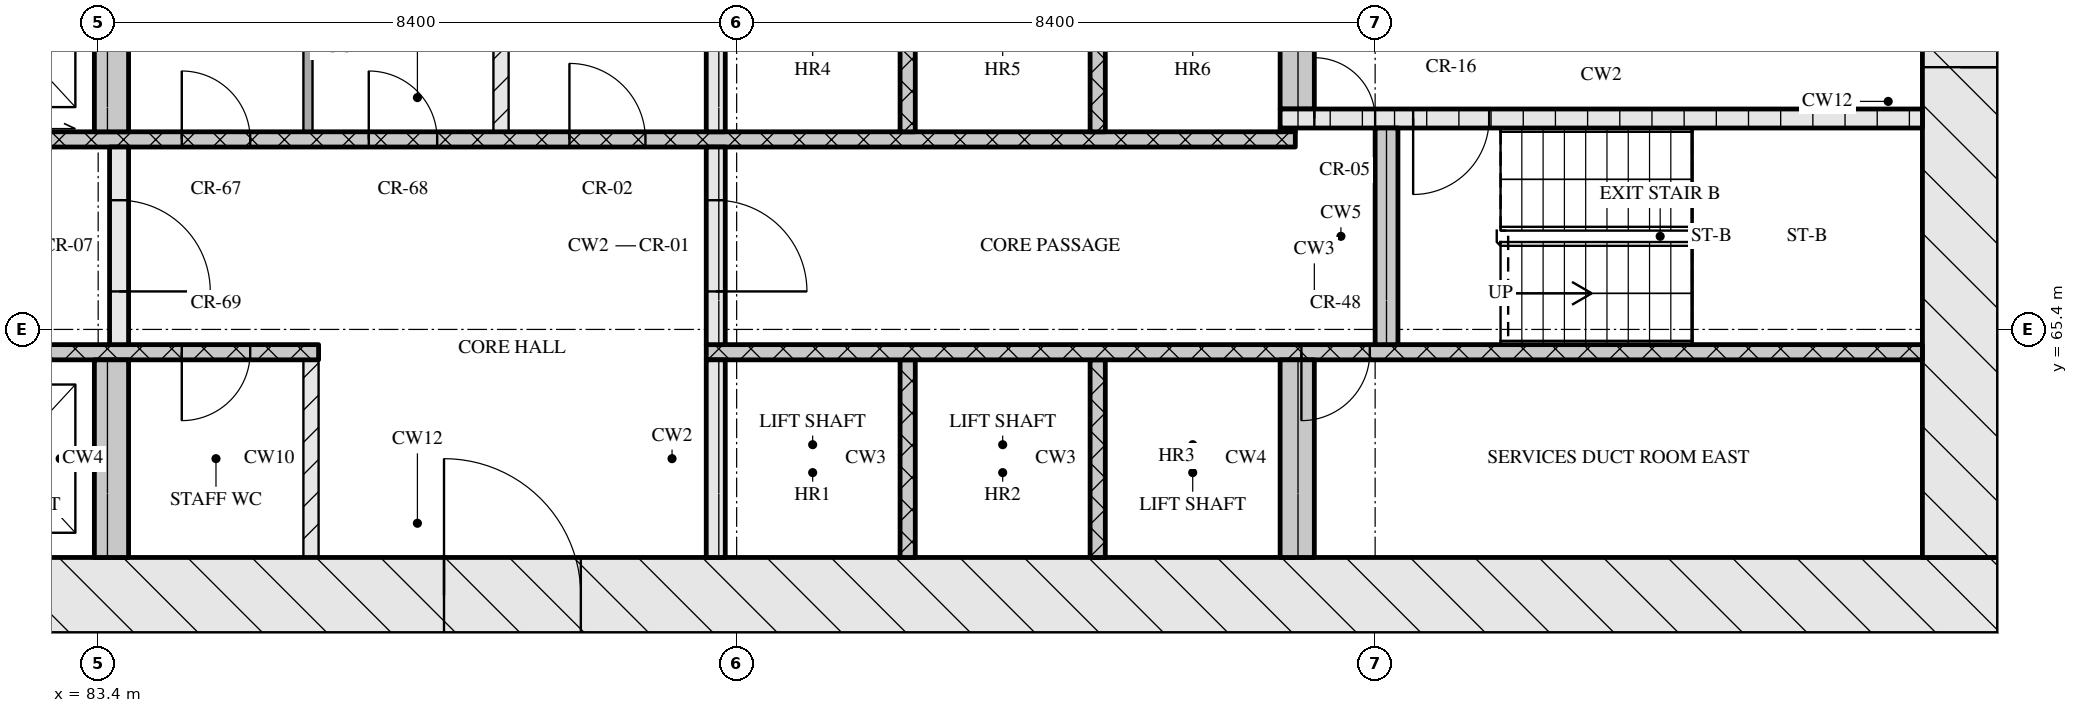
"""IFC4 building model, lengths in metres.
Left out: names, types, materials, properties, quantities, classifications, styles, units other than length and angle.
Written with IfcOpenShell. Run it as: python <this file> out.ifc"""

import sys

from ifc_helpers import new_model, si_unit, direction, frame, frame_2d, origin, place, context, subcontext, project, spatial, rectangle, extrude, element, fill, save


model = new_model("IFC4")
c1 = context("Model", 3, precision=1e-05, world=origin(), true_north=direction((0.0, 1.0)))
c2 = subcontext(c1, "Body", "Model", "MODEL_VIEW")
j1 = project(units=[si_unit("LENGTHUNIT", "METRE"), si_unit("PLANEANGLEUNIT", "RADIAN")], contexts=[c1])
p1 = place(None, origin())
s1 = spatial("IfcSite", under=j1, at=p1, CompositionType="ELEMENT")
p2 = place(p1, origin())
s2 = spatial("IfcBuilding", under=s1, at=p2, CompositionType="ELEMENT")
p3 = place(p2, frame((0.0, 0.0, 116.85)))
s3 = spatial("IfcBuildingStorey", under=s2, at=p3, CompositionType="ELEMENT", Elevation=116.85)
p4 = place(p3, frame((66.8, 61.9, 0.0), z_axis=(0.0, 0.0, 1.0), x_axis=(1.0, 0.0, 0.0)))
e1 = element("IfcWall", 1, at=p4, inside=s3, PredefinedType="SOLIDWALL", context=c2, shape_type="SweptSolid", body=[
    extrude(rectangle(XDim=41.6, YDim=1.0, at=frame_2d((20.8, 0.0))), origin(), (0.0, 0.0, 1.0), 3.32),
])
p5 = place(p4, frame((21.15, 0.0, 0.0)))
e2 = element("IfcOpeningElement", 2, at=p5, cuts=e1, PredefinedType="OPENING", context=c2, shape_type="SweptSolid", body=[
    extrude(rectangle(XDim=1.8, YDim=2.1, at=frame_2d((0.9, 1.05))), frame((0.0, 0.51, 0.0), z_axis=(0.0, -1.0, 0.0), x_axis=(1.0, 0.0, 0.0)), (0.0, 0.0, 1.0), 1.02),
])
p6 = place(p3, frame((107.9, 62.4, 0.0), z_axis=(0.0, 0.0, 1.0), x_axis=(0.0, 1.0, 0.0)))
e3 = element("IfcWall", 3, at=p6, inside=s3, PredefinedType="SOLIDWALL", context=c2, shape_type="SweptSolid", body=[
    extrude(rectangle(XDim=12.0, YDim=1.0, at=frame_2d((6.0, 0.0))), origin(), (0.0, 0.0, 1.0), 3.32),
])
p7 = place(p6, frame((6.45, 0.0, 0.0)))
e4 = element("IfcOpeningElement", 4, at=p7, cuts=e3, PredefinedType="OPENING", context=c2, shape_type="SweptSolid", body=[
    extrude(rectangle(XDim=1.2, YDim=2.1, at=frame_2d((0.6, 1.05))), frame((0.0, 0.51, 0.0), z_axis=(0.0, -1.0, 0.0), x_axis=(1.0, 0.0, 0.0)), (0.0, 0.0, 1.0), 1.02),
])
p8 = place(p3, frame((83.575, 62.4, 0.0), z_axis=(0.0, 0.0, 1.0), x_axis=(0.0, 1.0, 0.0)))
e5 = element("IfcWall", 5, at=p8, inside=s3, PredefinedType="SOLIDWALL", context=c2, shape_type="SweptSolid", body=[
    extrude(rectangle(XDim=2.6, YDim=0.45, at=frame_2d((1.3, 0.0))), origin(), (0.0, 0.0, 1.0), 3.32),
])
p9 = place(p3, frame((86.2, 62.4, 0.0), z_axis=(0.0, 0.0, 1.0), x_axis=(0.0, 1.0, 0.0)))
e6 = element("IfcWall", 6, at=p9, inside=s3, PredefinedType="PARTITIONING", context=c2, shape_type="SweptSolid", body=[
    extrude(rectangle(XDim=2.6, YDim=0.2, at=frame_2d((1.3, 0.0))), origin(), (0.0, 0.0, 1.0), 3.32),
])
p10 = place(p3, frame((91.525, 62.4, 0.0), z_axis=(0.0, 0.0, 1.0), x_axis=(0.0, 1.0, 0.0)))
e7 = element("IfcWall", 7, at=p10, inside=s3, PredefinedType="SOLIDWALL", context=c2, shape_type="SweptSolid", body=[
    extrude(rectangle(XDim=2.6, YDim=0.25, at=frame_2d((1.3, 0.0))), origin(), (0.0, 0.0, 1.0), 3.32),
])
for number, where, z_axis, x_axis in (
    (8, (94.05, 62.4, 0.0), (0.0, 0.0, 1.0), (0.0, 1.0, 0.0)),
    (9, (96.55, 62.4, 0.0), (0.0, 0.0, 1.0), (0.0, 1.0, 0.0)),
):
    element("IfcWall", number, at=place(p3, frame(where, z_axis=z_axis, x_axis=x_axis)), inside=s3, PredefinedType="SOLIDWALL", context=c2, shape_type="SweptSolid", body=[
        extrude(rectangle(XDim=2.6, YDim=0.2, at=frame_2d((1.3, 0.0))), origin(), (0.0, 0.0, 1.0), 3.32),
    ])
p11 = place(p3, frame((99.175, 62.4, 0.0), z_axis=(0.0, 0.0, 1.0), x_axis=(0.0, 1.0, 0.0)))
e10 = element("IfcWall", 10, at=p11, inside=s3, PredefinedType="SOLIDWALL", context=c2, shape_type="SweptSolid", body=[
    extrude(rectangle(XDim=2.6, YDim=0.45, at=frame_2d((1.3, 0.0))), origin(), (0.0, 0.0, 1.0), 3.32),
])
p12 = place(p3, frame((67.8, 65.1, 0.0), z_axis=(0.0, 0.0, 1.0), x_axis=(1.0, 0.0, 0.0)))
e11 = element("IfcWall", 11, at=p12, inside=s3, PredefinedType="SOLIDWALL", context=c2, shape_type="SweptSolid", body=[
    extrude(rectangle(XDim=18.5, YDim=0.2, at=frame_2d((9.25, 0.0))), origin(), (0.0, 0.0, 1.0), 3.32),
])
p13 = place(p12, frame((7.27, 0.0, 0.0)))
e12 = element("IfcOpeningElement", 12, at=p13, cuts=e11, PredefinedType="OPENING", context=c2, shape_type="SweptSolid", body=[
    extrude(rectangle(XDim=0.9, YDim=2.1, at=frame_2d((0.45, 1.05))), frame((0.0, 0.11, 0.0), z_axis=(0.0, -1.0, 0.0), x_axis=(1.0, 0.0, 0.0)), (0.0, 0.0, 1.0), 0.22),
])
p14 = place(p12, frame((8.85, 0.0, 0.0)))
e13 = element("IfcOpeningElement", 13, at=p14, cuts=e11, PredefinedType="OPENING", context=c2, shape_type="SweptSolid", body=[
    extrude(rectangle(XDim=1.1, YDim=2.1, at=frame_2d((0.55, 1.05))), frame((0.0, 0.11, 0.0), z_axis=(0.0, -1.0, 0.0), x_axis=(1.0, 0.0, 0.0)), (0.0, 0.0, 1.0), 0.22),
])
p15 = place(p12, frame((11.35, 0.0, 0.0)))
e14 = element("IfcOpeningElement", 14, at=p15, cuts=e11, PredefinedType="OPENING", context=c2, shape_type="SweptSolid", body=[
    extrude(rectangle(XDim=1.1, YDim=2.1, at=frame_2d((0.55, 1.05))), frame((0.0, 0.11, 0.0), z_axis=(0.0, -1.0, 0.0), x_axis=(1.0, 0.0, 0.0)), (0.0, 0.0, 1.0), 0.22),
])
p16 = place(p12, frame((13.85, 0.0, 0.0)))
e15 = element("IfcOpeningElement", 15, at=p16, cuts=e11, PredefinedType="OPENING", context=c2, shape_type="SweptSolid", body=[
    extrude(rectangle(XDim=1.1, YDim=2.1, at=frame_2d((0.55, 1.05))), frame((0.0, 0.11, 0.0), z_axis=(0.0, -1.0, 0.0), x_axis=(1.0, 0.0, 0.0)), (0.0, 0.0, 1.0), 0.22),
])
p17 = place(p12, frame((16.7, 0.0, 0.0)))
e16 = element("IfcOpeningElement", 16, at=p17, cuts=e11, PredefinedType="OPENING", context=c2, shape_type="SweptSolid", body=[
    extrude(rectangle(XDim=0.9, YDim=2.1, at=frame_2d((0.45, 1.05))), frame((0.0, 0.11, 0.0), z_axis=(0.0, -1.0, 0.0), x_axis=(1.0, 0.0, 0.0)), (0.0, 0.0, 1.0), 0.22),
])
p18 = place(p3, frame((91.4, 65.1, 0.0), z_axis=(0.0, 0.0, 1.0), x_axis=(1.0, 0.0, 0.0)))
e17 = element("IfcWall", 17, at=p18, inside=s3, PredefinedType="SOLIDWALL", context=c2, shape_type="SweptSolid", body=[
    extrude(rectangle(XDim=16.0, YDim=0.2, at=frame_2d((8.0, 0.0))), origin(), (0.0, 0.0, 1.0), 3.32),
])
p19 = place(p18, frame((7.83, 0.0, 0.0)))
e18 = element("IfcOpeningElement", 18, at=p19, cuts=e17, PredefinedType="OPENING", context=c2, shape_type="SweptSolid", body=[
    extrude(rectangle(XDim=0.9, YDim=2.1, at=frame_2d((0.45, 1.05))), frame((0.0, 0.11, 0.0), z_axis=(0.0, -1.0, 0.0), x_axis=(1.0, 0.0, 0.0)), (0.0, 0.0, 1.0), 0.22),
])
p20 = place(p3, frame((83.675, 65.2, 0.0), z_axis=(0.0, 0.0, 1.0), x_axis=(0.0, 1.0, 0.0)))
e19 = element("IfcWall", 19, at=p20, inside=s3, PredefinedType="SOLIDWALL", context=c2, shape_type="SweptSolid", body=[
    extrude(rectangle(XDim=2.6, YDim=0.25, at=frame_2d((1.3, 0.0))), origin(), (0.0, 0.0, 1.0), 3.32),
])
p21 = place(p20, frame((0.7, 0.0, 0.0)))
e20 = element("IfcOpeningElement", 20, at=p21, cuts=e19, PredefinedType="OPENING", context=c2, shape_type="SweptSolid", body=[
    extrude(rectangle(XDim=1.2, YDim=2.1, at=frame_2d((0.6, 1.05))), frame((0.0, 0.135, 0.0), z_axis=(0.0, -1.0, 0.0), x_axis=(1.0, 0.0, 0.0)), (0.0, 0.0, 1.0), 0.27),
])
p22 = place(p3, frame((91.525, 65.2, 0.0), z_axis=(0.0, 0.0, 1.0), x_axis=(0.0, 1.0, 0.0)))
e21 = element("IfcWall", 21, at=p22, inside=s3, PredefinedType="SOLIDWALL", context=c2, shape_type="SweptSolid", body=[
    extrude(rectangle(XDim=2.6, YDim=0.25, at=frame_2d((1.3, 0.0))), origin(), (0.0, 0.0, 1.0), 3.32),
])
p23 = place(p22, frame((0.7, 0.0, 0.0)))
e22 = element("IfcOpeningElement", 22, at=p23, cuts=e21, PredefinedType="OPENING", context=c2, shape_type="SweptSolid", body=[
    extrude(rectangle(XDim=1.2, YDim=2.1, at=frame_2d((0.6, 1.05))), frame((0.0, 0.135, 0.0), z_axis=(0.0, -1.0, 0.0), x_axis=(1.0, 0.0, 0.0)), (0.0, 0.0, 1.0), 0.27),
])
p24 = place(p3, frame((100.35, 65.2, 0.0), z_axis=(0.0, 0.0, 1.0), x_axis=(0.0, 1.0, 0.0)))
e23 = element("IfcWall", 23, at=p24, inside=s3, PredefinedType="SOLIDWALL", context=c2, shape_type="SweptSolid", body=[
    extrude(rectangle(XDim=2.85, YDim=0.3, at=frame_2d((1.425, 0.0))), origin(), (0.0, 0.0, 1.0), 3.32),
])
p25 = place(p3, frame((76.05, 67.9, 0.0), z_axis=(0.0, 0.0, 1.0), x_axis=(1.0, 0.0, 0.0)))
e24 = element("IfcWall", 24, at=p25, inside=s3, PredefinedType="SOLIDWALL", context=c2, shape_type="SweptSolid", body=[
    extrude(rectangle(XDim=23.1, YDim=0.2, at=frame_2d((11.55, 0.0))), origin(), (0.0, 0.0, 1.0), 3.32),
])
p26 = place(p25, frame((0.6, 0.0, 0.0)))
e25 = element("IfcOpeningElement", 25, at=p26, cuts=e24, PredefinedType="OPENING", context=c2, shape_type="SweptSolid", body=[
    extrude(rectangle(XDim=1.1, YDim=2.1, at=frame_2d((0.55, 1.05))), frame((0.0, 0.11, 0.0), z_axis=(0.0, -1.0, 0.0), x_axis=(1.0, 0.0, 0.0)), (0.0, 0.0, 1.0), 0.22),
])
p27 = place(p25, frame((3.1, 0.0, 0.0)))
e26 = element("IfcOpeningElement", 26, at=p27, cuts=e24, PredefinedType="OPENING", context=c2, shape_type="SweptSolid", body=[
    extrude(rectangle(XDim=1.1, YDim=2.1, at=frame_2d((0.55, 1.05))), frame((0.0, 0.11, 0.0), z_axis=(0.0, -1.0, 0.0), x_axis=(1.0, 0.0, 0.0)), (0.0, 0.0, 1.0), 0.22),
])
p28 = place(p25, frame((5.6, 0.0, 0.0)))
e27 = element("IfcOpeningElement", 27, at=p28, cuts=e24, PredefinedType="OPENING", context=c2, shape_type="SweptSolid", body=[
    extrude(rectangle(XDim=1.1, YDim=2.1, at=frame_2d((0.55, 1.05))), frame((0.0, 0.11, 0.0), z_axis=(0.0, -1.0, 0.0), x_axis=(1.0, 0.0, 0.0)), (0.0, 0.0, 1.0), 0.22),
])
p29 = place(p25, frame((8.45, 0.0, 0.0)))
e28 = element("IfcOpeningElement", 28, at=p29, cuts=e24, PredefinedType="OPENING", context=c2, shape_type="SweptSolid", body=[
    extrude(rectangle(XDim=0.9, YDim=2.1, at=frame_2d((0.45, 1.05))), frame((0.0, 0.11, 0.0), z_axis=(0.0, -1.0, 0.0), x_axis=(1.0, 0.0, 0.0)), (0.0, 0.0, 1.0), 0.22),
])
p30 = place(p25, frame((10.91, 0.0, 0.0)))
e29 = element("IfcOpeningElement", 29, at=p30, cuts=e24, PredefinedType="OPENING", context=c2, shape_type="SweptSolid", body=[
    extrude(rectangle(XDim=0.9, YDim=2.1, at=frame_2d((0.45, 1.05))), frame((0.0, 0.11, 0.0), z_axis=(0.0, -1.0, 0.0), x_axis=(1.0, 0.0, 0.0)), (0.0, 0.0, 1.0), 0.22),
])
p31 = place(p25, frame((13.55, 0.0, 0.0)))
e30 = element("IfcOpeningElement", 30, at=p31, cuts=e24, PredefinedType="OPENING", context=c2, shape_type="SweptSolid", body=[
    extrude(rectangle(XDim=1.0, YDim=2.1, at=frame_2d((0.5, 1.05))), frame((0.0, 0.11, 0.0), z_axis=(0.0, -1.0, 0.0), x_axis=(1.0, 0.0, 0.0)), (0.0, 0.0, 1.0), 0.22),
])
p32 = place(p3, frame((83.575, 68.0, 0.0), z_axis=(0.0, 0.0, 1.0), x_axis=(0.0, 1.0, 0.0)))
e31 = element("IfcWall", 31, at=p32, inside=s3, PredefinedType="SOLIDWALL", context=c2, shape_type="SweptSolid", body=[
    extrude(rectangle(XDim=2.6, YDim=0.45, at=frame_2d((1.3, 0.0))), origin(), (0.0, 0.0, 1.0), 3.32),
])
p33 = place(p3, frame((86.16, 68.0, 0.0), z_axis=(0.0, 0.0, 1.0), x_axis=(0.0, 1.0, 0.0)))
e32 = element("IfcWall", 32, at=p33, inside=s3, PredefinedType="PARTITIONING", context=c2, shape_type="SweptSolid", body=[
    extrude(rectangle(XDim=2.6, YDim=0.12, at=frame_2d((1.3, 0.0))), origin(), (0.0, 0.0, 1.0), 3.32),
])
p34 = place(p3, frame((88.7, 68.0, 0.0), z_axis=(0.0, 0.0, 1.0), x_axis=(0.0, 1.0, 0.0)))
e33 = element("IfcWall", 33, at=p34, inside=s3, PredefinedType="PARTITIONING", context=c2, shape_type="SweptSolid", body=[
    extrude(rectangle(XDim=2.6, YDim=0.2, at=frame_2d((1.3, 0.0))), origin(), (0.0, 0.0, 1.0), 3.32),
])
p35 = place(p3, frame((91.525, 68.0, 0.0), z_axis=(0.0, 0.0, 1.0), x_axis=(0.0, 1.0, 0.0)))
e34 = element("IfcWall", 34, at=p35, inside=s3, PredefinedType="SOLIDWALL", context=c2, shape_type="SweptSolid", body=[
    extrude(rectangle(XDim=2.6, YDim=0.25, at=frame_2d((1.3, 0.0))), origin(), (0.0, 0.0, 1.0), 3.32),
])
for number, where, z_axis, x_axis in (
    (35, (94.05, 68.0, 0.0), (0.0, 0.0, 1.0), (0.0, 1.0, 0.0)),
    (36, (96.55, 68.0, 0.0), (0.0, 0.0, 1.0), (0.0, 1.0, 0.0)),
):
    element("IfcWall", number, at=place(p3, frame(where, z_axis=z_axis, x_axis=x_axis)), inside=s3, PredefinedType="SOLIDWALL", context=c2, shape_type="SweptSolid", body=[
        extrude(rectangle(XDim=2.6, YDim=0.2, at=frame_2d((1.3, 0.0))), origin(), (0.0, 0.0, 1.0), 3.32),
    ])
p36 = place(p3, frame((98.95, 68.025, 0.0), z_axis=(0.0, 0.0, 1.0), x_axis=(1.0, 0.0, 0.0)))
e37 = element("IfcWall", 37, at=p36, inside=s3, PredefinedType="SOLIDWALL", context=c2, shape_type="SweptSolid", body=[
    extrude(rectangle(XDim=0.2, YDim=0.05, at=frame_2d((0.1, 0.0))), origin(), (0.0, 0.0, 1.0), 3.32),
])
p37 = place(p3, frame((98.95, 68.175, 0.0), z_axis=(0.0, 0.0, 1.0), x_axis=(1.0, 0.0, 0.0)))
e38 = element("IfcWall", 38, at=p37, inside=s3, PredefinedType="SOLIDWALL", context=c2, shape_type="SweptSolid", body=[
    extrude(rectangle(XDim=8.45, YDim=0.25, at=frame_2d((4.225, 0.0))), origin(), (0.0, 0.0, 1.0), 3.32),
])
p38 = place(p37, frame((0.45, 0.0, 0.0)))
e39 = element("IfcOpeningElement", 39, at=p38, cuts=e38, PredefinedType="OPENING", context=c2, shape_type="SweptSolid", body=[
    extrude(rectangle(XDim=0.8, YDim=2.1, at=frame_2d((0.4, 1.05))), frame((0.0, 0.135, 0.0), z_axis=(0.0, -1.0, 0.0), x_axis=(1.0, 0.0, 0.0)), (0.0, 0.0, 1.0), 0.27),
])
p39 = place(p37, frame((1.75, 0.0, 0.0)))
e40 = element("IfcOpeningElement", 40, at=p39, cuts=e38, PredefinedType="OPENING", context=c2, shape_type="SweptSolid", body=[
    extrude(rectangle(XDim=1.0, YDim=2.1, at=frame_2d((0.5, 1.05))), frame((0.0, 0.135, 0.0), z_axis=(0.0, -1.0, 0.0), x_axis=(1.0, 0.0, 0.0)), (0.0, 0.0, 1.0), 0.27),
])
p40 = place(p3, frame((99.175, 68.3, 0.0), z_axis=(0.0, 0.0, 1.0), x_axis=(0.0, 1.0, 0.0)))
e41 = element("IfcWall", 41, at=p40, inside=s3, PredefinedType="SOLIDWALL", context=c2, shape_type="SweptSolid", body=[
    extrude(rectangle(XDim=2.3, YDim=0.45, at=frame_2d((1.15, 0.0))), origin(), (0.0, 0.0, 1.0), 3.32),
])
p41 = place(p5, origin())
e42 = element("IfcDoor", 42, at=p41, inside=s3, OperationType="DOUBLE_DOOR_SINGLE_SWING", PredefinedType="DOOR", context=c2, shape_type="SweptSolid", body=[
    extrude(rectangle(XDim=1.8, YDim=2.1, at=frame_2d((0.9, 1.05))), frame((0.0, 0.025, 0.0), z_axis=(0.0, -1.0, 0.0), x_axis=(1.0, 0.0, 0.0)), (0.0, 0.0, 1.0), 0.05),
])
fill(e2, e42)
p42 = place(p17, origin())
e43 = element("IfcDoor", 43, at=p42, inside=s3, OperationType="SINGLE_SWING_RIGHT", PredefinedType="DOOR", context=c2, shape_type="SweptSolid", body=[
    extrude(rectangle(XDim=0.9, YDim=2.1, at=frame_2d((0.45, 1.05))), frame((0.0, 0.025, 0.0), z_axis=(0.0, -1.0, 0.0), x_axis=(1.0, 0.0, 0.0)), (0.0, 0.0, 1.0), 0.05),
])
fill(e16, e43)
p43 = place(p19, origin())
e44 = element("IfcDoor", 44, at=p43, inside=s3, OperationType="SINGLE_SWING_RIGHT", PredefinedType="DOOR", context=c2, shape_type="SweptSolid", body=[
    extrude(rectangle(XDim=0.9, YDim=2.1, at=frame_2d((0.45, 1.05))), frame((0.0, 0.025, 0.0), z_axis=(0.0, -1.0, 0.0), x_axis=(1.0, 0.0, 0.0)), (0.0, 0.0, 1.0), 0.05),
])
fill(e18, e44)
p44 = place(p21, origin())
e45 = element("IfcDoor", 45, at=p44, inside=s3, OperationType="SINGLE_SWING_RIGHT", PredefinedType="DOOR", context=c2, shape_type="SweptSolid", body=[
    extrude(rectangle(XDim=1.2, YDim=2.1, at=frame_2d((0.6, 1.05))), frame((0.0, 0.025, 0.0), z_axis=(0.0, -1.0, 0.0), x_axis=(1.0, 0.0, 0.0)), (0.0, 0.0, 1.0), 0.05),
])
fill(e20, e45)
p45 = place(p23, origin())
e46 = element("IfcDoor", 46, at=p45, inside=s3, OperationType="SINGLE_SWING_RIGHT", PredefinedType="DOOR", context=c2, shape_type="SweptSolid", body=[
    extrude(rectangle(XDim=1.2, YDim=2.1, at=frame_2d((0.6, 1.05))), frame((0.0, 0.025, 0.0), z_axis=(0.0, -1.0, 0.0), x_axis=(1.0, 0.0, 0.0)), (0.0, 0.0, 1.0), 0.05),
])
fill(e22, e46)
p46 = place(p29, origin())
e47 = element("IfcDoor", 47, at=p46, inside=s3, OperationType="SINGLE_SWING_LEFT", PredefinedType="DOOR", context=c2, shape_type="SweptSolid", body=[
    extrude(rectangle(XDim=0.9, YDim=2.1, at=frame_2d((0.45, 1.05))), frame((0.0, 0.025, 0.0), z_axis=(0.0, -1.0, 0.0), x_axis=(1.0, 0.0, 0.0)), (0.0, 0.0, 1.0), 0.05),
])
fill(e28, e47)
p47 = place(p30, origin())
e48 = element("IfcDoor", 48, at=p47, inside=s3, OperationType="SINGLE_SWING_LEFT", PredefinedType="DOOR", context=c2, shape_type="SweptSolid", body=[
    extrude(rectangle(XDim=0.9, YDim=2.1, at=frame_2d((0.45, 1.05))), frame((0.0, 0.025, 0.0), z_axis=(0.0, -1.0, 0.0), x_axis=(1.0, 0.0, 0.0)), (0.0, 0.0, 1.0), 0.05),
])
fill(e29, e48)
p48 = place(p31, origin())
e49 = element("IfcDoor", 49, at=p48, inside=s3, OperationType="SINGLE_SWING_LEFT", PredefinedType="DOOR", context=c2, shape_type="SweptSolid", body=[
    extrude(rectangle(XDim=1.0, YDim=2.1, at=frame_2d((0.5, 1.05))), frame((0.0, 0.025, 0.0), z_axis=(0.0, -1.0, 0.0), x_axis=(1.0, 0.0, 0.0)), (0.0, 0.0, 1.0), 0.05),
])
fill(e30, e49)
p49 = place(p38, origin())
e50 = element("IfcDoor", 50, at=p49, inside=s3, OperationType="SINGLE_SWING_LEFT", PredefinedType="DOOR", context=c2, shape_type="SweptSolid", body=[
    extrude(rectangle(XDim=0.8, YDim=2.1, at=frame_2d((0.4, 1.05))), frame((0.0, 0.025, 0.0), z_axis=(0.0, -1.0, 0.0), x_axis=(1.0, 0.0, 0.0)), (0.0, 0.0, 1.0), 0.05),
])
fill(e39, e50)
p50 = place(p39, origin())
e51 = element("IfcDoor", 51, at=p50, inside=s3, OperationType="SINGLE_SWING_RIGHT", PredefinedType="DOOR", context=c2, shape_type="SweptSolid", body=[
    extrude(rectangle(XDim=1.0, YDim=2.1, at=frame_2d((0.5, 1.05))), frame((0.0, 0.025, 0.0), z_axis=(0.0, -1.0, 0.0), x_axis=(1.0, 0.0, 0.0)), (0.0, 0.0, 1.0), 0.05),
])
fill(e40, e51)
p51 = place(p7, origin())
e52 = element("IfcDoor", 52, at=p51, inside=s3, OperationType="SINGLE_SWING_RIGHT", PredefinedType="DOOR", context=c2, shape_type="SweptSolid", body=[
    extrude(rectangle(XDim=1.2, YDim=2.1, at=frame_2d((0.6, 1.05))), frame((0.0, 0.025, 0.0), z_axis=(0.0, -1.0, 0.0), x_axis=(1.0, 0.0, 0.0)), (0.0, 0.0, 1.0), 0.05),
])
fill(e4, e52)
save(model, sys.argv[1])
